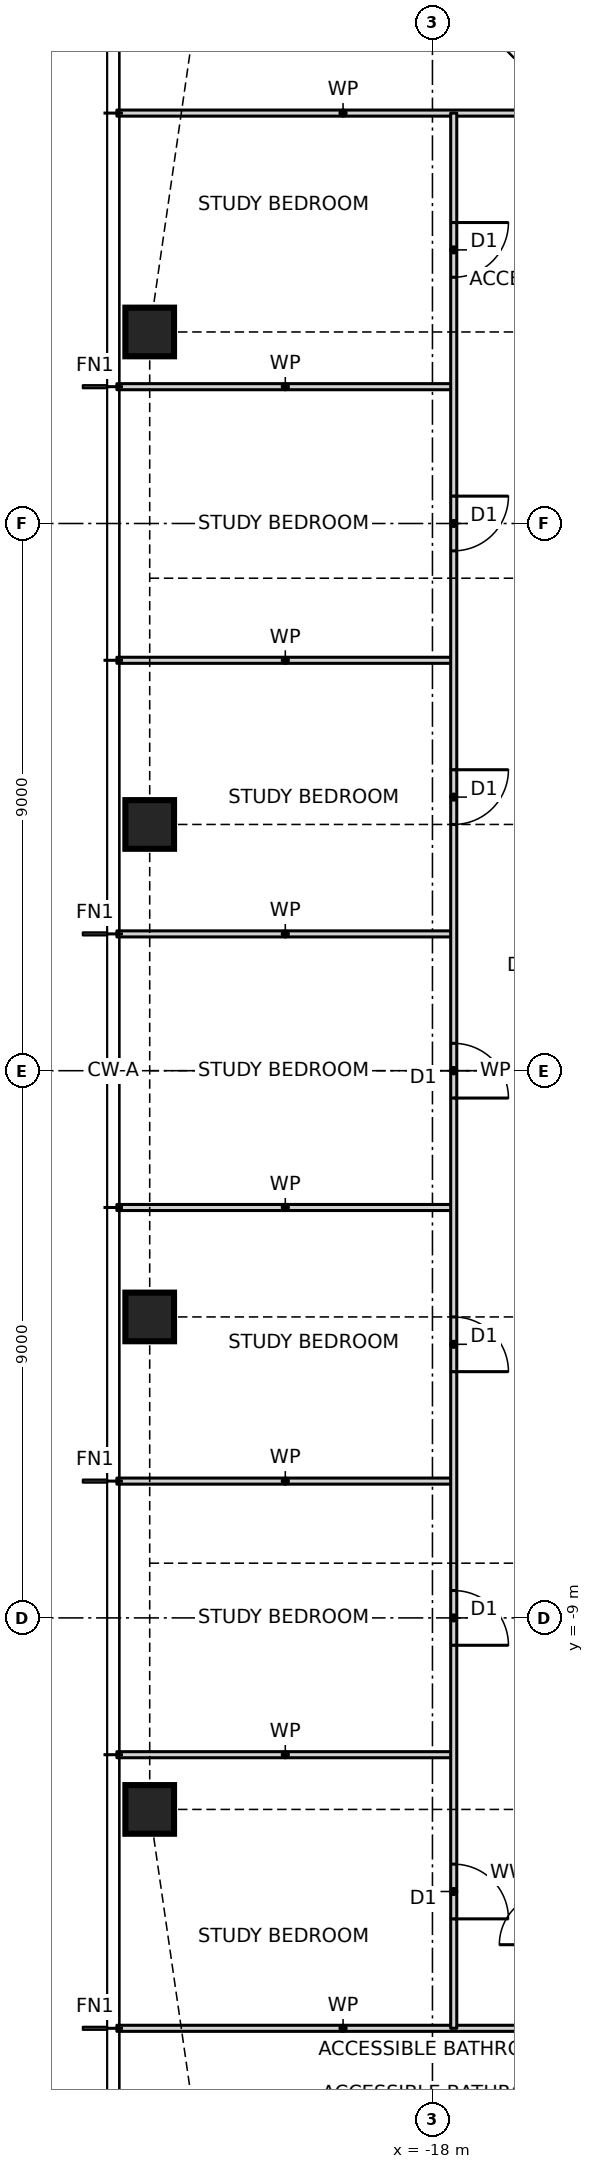
"""IFC4 building model, lengths in metres.
Left out: names, types, materials, properties, quantities, classifications, styles, units other than length and angle.
Written with IfcOpenShell. Run it as: python <this file> out.ifc"""

import sys

from ifc_helpers import new_model, si_unit, direction, frame, frame_2d, origin, origin_2d, place, context, subcontext, project, spatial, rectangle, hollow_rectangle, extrude, element, fill, save


model = new_model("IFC4")
c1 = context("Model", 3, precision=1e-05, world=origin(), true_north=direction((0.0, 1.0)))
c2 = subcontext(c1, "Body", "Model", "MODEL_VIEW")
j1 = project(units=[si_unit("LENGTHUNIT", "METRE"), si_unit("PLANEANGLEUNIT", "RADIAN")], contexts=[c1])
p1 = place(None, origin())
s1 = spatial("IfcSite", under=j1, at=p1, CompositionType="ELEMENT")
p2 = place(p1, origin())
s2 = spatial("IfcBuilding", under=s1, at=p2, CompositionType="ELEMENT")
p3 = place(p2, frame((0.0, 0.0, 18.5)))
s3 = spatial("IfcBuildingStorey", under=s2, at=p3, CompositionType="ELEMENT", Elevation=18.5)
for number, where, z_axis, x_axis in (
    (1, (-22.65, 12.15, 0.0), (0.0, 0.0, 1.0), (1.0, 0.0, 0.0)),
    (2, (-22.65, 4.05, 0.0), (0.0, 0.0, 1.0), (1.0, 0.0, 0.0)),
    (3, (-22.65, -4.05, 0.0), (0.0, 0.0, 1.0), (1.0, 0.0, 0.0)),
    (4, (-22.65, -12.15, 0.0), (0.0, 0.0, 1.0), (1.0, 0.0, 0.0)),
):
    element("IfcColumn", number, at=place(p3, frame(where, z_axis=z_axis, x_axis=x_axis)), inside=s3, PredefinedType="COLUMN", context=c2, shape_type="SweptSolid", body=[
        extrude(hollow_rectangle(XDim=0.8, YDim=0.8, WallThickness=0.09, at=origin_2d()), origin(), (0.0, 0.0, 1.0), 3.5),
    ])
p4 = place(p3, frame((-23.19, -15.75, 0.0), z_axis=(0.0, 0.0, 1.0), x_axis=(1.0, 0.0, 0.0)))
e5 = element("IfcWall", 5, at=p4, inside=s3, PredefinedType="PARTITIONING", context=c2, shape_type="SweptSolid", body=[
    extrude(rectangle(XDim=7.44, YDim=0.1, at=frame_2d((3.72, 0.0))), origin(), (0.0, 0.0, 1.0), 3.27),
])
for number, where, z_axis, x_axis in (
    (6, (-23.19, -11.25, 0.0), (0.0, 0.0, 1.0), (1.0, 0.0, 0.0)),
    (7, (-23.19, -6.75, 0.0), (0.0, 0.0, 1.0), (1.0, 0.0, 0.0)),
    (8, (-23.19, -2.25, 0.0), (0.0, 0.0, 1.0), (1.0, 0.0, 0.0)),
    (9, (-23.19, 2.25, 0.0), (0.0, 0.0, 1.0), (1.0, 0.0, 0.0)),
    (10, (-23.19, 6.75, 0.0), (0.0, 0.0, 1.0), (1.0, 0.0, 0.0)),
    (11, (-23.19, 11.25, 0.0), (0.0, 0.0, 1.0), (1.0, 0.0, 0.0)),
):
    element("IfcWall", number, at=place(p3, frame(where, z_axis=z_axis, x_axis=x_axis)), inside=s3, PredefinedType="PARTITIONING", context=c2, shape_type="SweptSolid", body=[
        extrude(rectangle(XDim=5.54, YDim=0.1, at=frame_2d((2.77, 0.0))), origin(), (0.0, 0.0, 1.0), 3.27),
    ])
p5 = place(p3, frame((-23.19, 15.75, 0.0), z_axis=(0.0, 0.0, 1.0), x_axis=(1.0, 0.0, 0.0)))
e12 = element("IfcWall", 12, at=p5, inside=s3, PredefinedType="PARTITIONING", context=c2, shape_type="SweptSolid", body=[
    extrude(rectangle(XDim=7.44, YDim=0.1, at=frame_2d((3.72, 0.0))), origin(), (0.0, 0.0, 1.0), 3.27),
])
p6 = place(p3, frame((-17.65, -15.75, 0.0), z_axis=(0.0, 0.0, 1.0), x_axis=(0.0, 1.0, 0.0)))
e13 = element("IfcWall", 13, at=p6, inside=s3, PredefinedType="PARTITIONING", context=c2, shape_type="SweptSolid", body=[
    extrude(rectangle(XDim=31.5, YDim=0.1, at=frame_2d((15.75, 0.0))), origin(), (0.0, 0.0, 1.0), 3.27),
])
p7 = place(p6, frame((28.8, 0.0, 0.0)))
e14 = element("IfcOpeningElement", 14, at=p7, cuts=e13, PredefinedType="OPENING", context=c2, shape_type="SweptSolid", body=[
    extrude(rectangle(XDim=0.9, YDim=2.1, at=frame_2d((0.45, 1.05))), frame((0.0, 0.06, 0.0), z_axis=(0.0, -1.0, 0.0), x_axis=(1.0, 0.0, 0.0)), (0.0, 0.0, 1.0), 0.12),
])
p8 = place(p6, frame((24.3, 0.0, 0.0)))
e15 = element("IfcOpeningElement", 15, at=p8, cuts=e13, PredefinedType="OPENING", context=c2, shape_type="SweptSolid", body=[
    extrude(rectangle(XDim=0.9, YDim=2.1, at=frame_2d((0.45, 1.05))), frame((0.0, 0.06, 0.0), z_axis=(0.0, -1.0, 0.0), x_axis=(1.0, 0.0, 0.0)), (0.0, 0.0, 1.0), 0.12),
])
p9 = place(p6, frame((19.8, 0.0, 0.0)))
e16 = element("IfcOpeningElement", 16, at=p9, cuts=e13, PredefinedType="OPENING", context=c2, shape_type="SweptSolid", body=[
    extrude(rectangle(XDim=0.9, YDim=2.1, at=frame_2d((0.45, 1.05))), frame((0.0, 0.06, 0.0), z_axis=(0.0, -1.0, 0.0), x_axis=(1.0, 0.0, 0.0)), (0.0, 0.0, 1.0), 0.12),
])
p10 = place(p6, frame((15.3, 0.0, 0.0)))
e17 = element("IfcOpeningElement", 17, at=p10, cuts=e13, PredefinedType="OPENING", context=c2, shape_type="SweptSolid", body=[
    extrude(rectangle(XDim=0.9, YDim=2.1, at=frame_2d((0.45, 1.05))), frame((0.0, 0.06, 0.0), z_axis=(0.0, -1.0, 0.0), x_axis=(1.0, 0.0, 0.0)), (0.0, 0.0, 1.0), 0.12),
])
p11 = place(p6, frame((10.8, 0.0, 0.0)))
e18 = element("IfcOpeningElement", 18, at=p11, cuts=e13, PredefinedType="OPENING", context=c2, shape_type="SweptSolid", body=[
    extrude(rectangle(XDim=0.9, YDim=2.1, at=frame_2d((0.45, 1.05))), frame((0.0, 0.06, 0.0), z_axis=(0.0, -1.0, 0.0), x_axis=(1.0, 0.0, 0.0)), (0.0, 0.0, 1.0), 0.12),
])
p12 = place(p6, frame((6.3, 0.0, 0.0)))
e19 = element("IfcOpeningElement", 19, at=p12, cuts=e13, PredefinedType="OPENING", context=c2, shape_type="SweptSolid", body=[
    extrude(rectangle(XDim=0.9, YDim=2.1, at=frame_2d((0.45, 1.05))), frame((0.0, 0.06, 0.0), z_axis=(0.0, -1.0, 0.0), x_axis=(1.0, 0.0, 0.0)), (0.0, 0.0, 1.0), 0.12),
])
p13 = place(p6, frame((1.8, 0.0, 0.0)))
e20 = element("IfcOpeningElement", 20, at=p13, cuts=e13, PredefinedType="OPENING", context=c2, shape_type="SweptSolid", body=[
    extrude(rectangle(XDim=0.9, YDim=2.1, at=frame_2d((0.45, 1.05))), frame((0.0, 0.06, 0.0), z_axis=(0.0, -1.0, 0.0), x_axis=(1.0, 0.0, 0.0)), (0.0, 0.0, 1.0), 0.12),
])
p14 = place(p7, frame((0.9, 0.0, 0.0), z_axis=(0.0, 0.0, 1.0), x_axis=(-1.0, 0.0, 0.0)))
e21 = element("IfcDoor", 21, at=p14, inside=s3, OperationType="SINGLE_SWING_LEFT", PredefinedType="DOOR", context=c2, shape_type="SweptSolid", body=[
    extrude(rectangle(XDim=0.9, YDim=2.1, at=frame_2d((0.45, 1.05))), frame((0.0, 0.025, 0.0), z_axis=(0.0, -1.0, 0.0), x_axis=(1.0, 0.0, 0.0)), (0.0, 0.0, 1.0), 0.05),
])
fill(e14, e21)
p15 = place(p8, frame((0.9, 0.0, 0.0), z_axis=(0.0, 0.0, 1.0), x_axis=(-1.0, 0.0, 0.0)))
e22 = element("IfcDoor", 22, at=p15, inside=s3, OperationType="SINGLE_SWING_LEFT", PredefinedType="DOOR", context=c2, shape_type="SweptSolid", body=[
    extrude(rectangle(XDim=0.9, YDim=2.1, at=frame_2d((0.45, 1.05))), frame((0.0, 0.025, 0.0), z_axis=(0.0, -1.0, 0.0), x_axis=(1.0, 0.0, 0.0)), (0.0, 0.0, 1.0), 0.05),
])
fill(e15, e22)
p16 = place(p9, frame((0.9, 0.0, 0.0), z_axis=(0.0, 0.0, 1.0), x_axis=(-1.0, 0.0, 0.0)))
e23 = element("IfcDoor", 23, at=p16, inside=s3, OperationType="SINGLE_SWING_LEFT", PredefinedType="DOOR", context=c2, shape_type="SweptSolid", body=[
    extrude(rectangle(XDim=0.9, YDim=2.1, at=frame_2d((0.45, 1.05))), frame((0.0, 0.025, 0.0), z_axis=(0.0, -1.0, 0.0), x_axis=(1.0, 0.0, 0.0)), (0.0, 0.0, 1.0), 0.05),
])
fill(e16, e23)
p17 = place(p10, frame((0.9, 0.0, 0.0), z_axis=(0.0, 0.0, 1.0), x_axis=(-1.0, 0.0, 0.0)))
e24 = element("IfcDoor", 24, at=p17, inside=s3, OperationType="SINGLE_SWING_RIGHT", PredefinedType="DOOR", context=c2, shape_type="SweptSolid", body=[
    extrude(rectangle(XDim=0.9, YDim=2.1, at=frame_2d((0.45, 1.05))), frame((0.0, 0.025, 0.0), z_axis=(0.0, -1.0, 0.0), x_axis=(1.0, 0.0, 0.0)), (0.0, 0.0, 1.0), 0.05),
])
fill(e17, e24)
p18 = place(p11, frame((0.9, 0.0, 0.0), z_axis=(0.0, 0.0, 1.0), x_axis=(-1.0, 0.0, 0.0)))
e25 = element("IfcDoor", 25, at=p18, inside=s3, OperationType="SINGLE_SWING_RIGHT", PredefinedType="DOOR", context=c2, shape_type="SweptSolid", body=[
    extrude(rectangle(XDim=0.9, YDim=2.1, at=frame_2d((0.45, 1.05))), frame((0.0, 0.025, 0.0), z_axis=(0.0, -1.0, 0.0), x_axis=(1.0, 0.0, 0.0)), (0.0, 0.0, 1.0), 0.05),
])
fill(e18, e25)
p19 = place(p12, frame((0.9, 0.0, 0.0), z_axis=(0.0, 0.0, 1.0), x_axis=(-1.0, 0.0, 0.0)))
e26 = element("IfcDoor", 26, at=p19, inside=s3, OperationType="SINGLE_SWING_RIGHT", PredefinedType="DOOR", context=c2, shape_type="SweptSolid", body=[
    extrude(rectangle(XDim=0.9, YDim=2.1, at=frame_2d((0.45, 1.05))), frame((0.0, 0.025, 0.0), z_axis=(0.0, -1.0, 0.0), x_axis=(1.0, 0.0, 0.0)), (0.0, 0.0, 1.0), 0.05),
])
fill(e19, e26)
p20 = place(p13, frame((0.9, 0.0, 0.0), z_axis=(0.0, 0.0, 1.0), x_axis=(-1.0, 0.0, 0.0)))
e27 = element("IfcDoor", 27, at=p20, inside=s3, OperationType="SINGLE_SWING_RIGHT", PredefinedType="DOOR", context=c2, shape_type="SweptSolid", body=[
    extrude(rectangle(XDim=0.9, YDim=2.1, at=frame_2d((0.45, 1.05))), frame((0.0, 0.025, 0.0), z_axis=(0.0, -1.0, 0.0), x_axis=(1.0, 0.0, 0.0)), (0.0, 0.0, 1.0), 0.05),
])
fill(e20, e27)
save(model, sys.argv[1])
